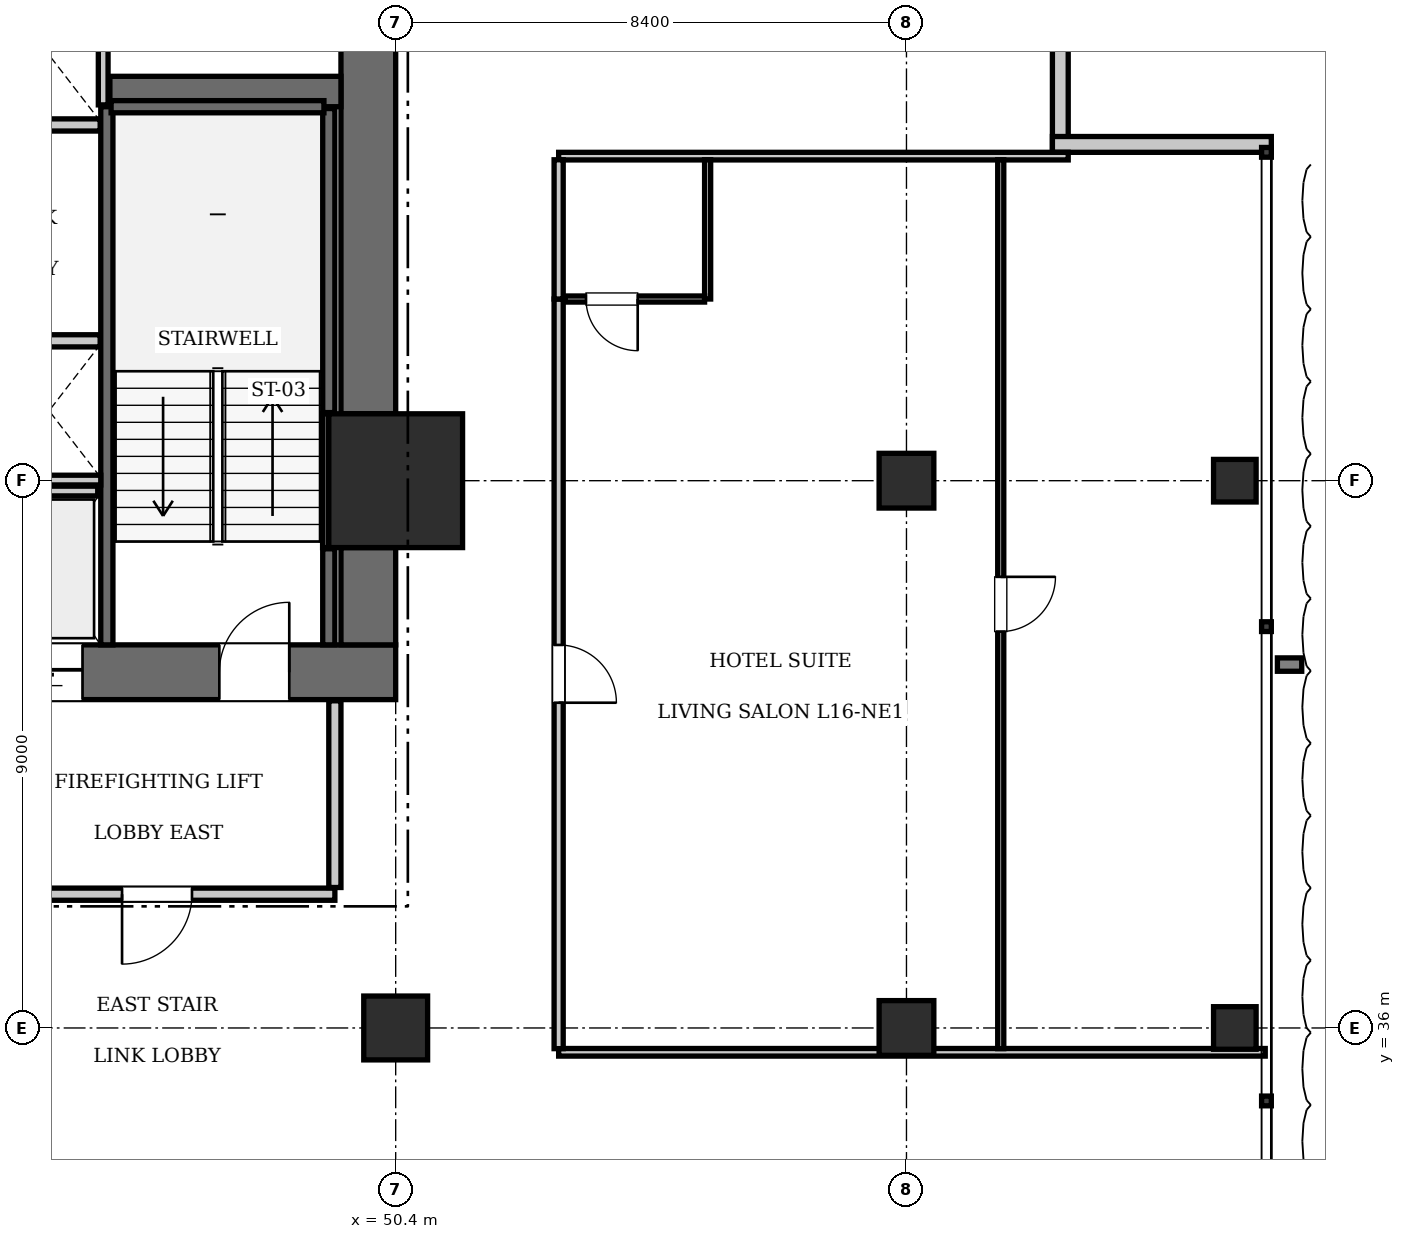
"""IFC4 building model, lengths in metres.
Left out: names, types, materials, properties, quantities, classifications, styles, units other than length and angle.
Written with IfcOpenShell. Run it as: python <this file> out.ifc"""

import sys

from ifc_helpers import new_model, si_unit, direction, frame, frame_2d, origin, origin_2d, place, context, subcontext, project, spatial, rectangle, i_section, extrude, element, fill, save


model = new_model("IFC4")
c1 = context("Model", 3, precision=1e-05, world=origin(), true_north=direction((0.0, 1.0)))
c2 = subcontext(c1, "Body", "Model", "MODEL_VIEW")
j1 = project(units=[si_unit("LENGTHUNIT", "METRE"), si_unit("PLANEANGLEUNIT", "RADIAN")], contexts=[c1])
p1 = place(None, origin())
s1 = spatial("IfcSite", under=j1, at=p1, CompositionType="ELEMENT")
p2 = place(p1, origin())
s2 = spatial("IfcBuilding", under=s1, at=p2, CompositionType="ELEMENT")
p3 = place(p2, frame((0.0, 0.0, 69.3)))
s3 = spatial("IfcBuildingStorey", under=s2, at=p3, CompositionType="ELEMENT", Elevation=69.3)
p4 = place(p3, frame((50.4, 45.0, 0.0), z_axis=(0.0, 0.0, 1.0), x_axis=(1.0, 0.0, 0.0)))
e1 = element("IfcColumn", 1, at=p4, inside=s3, PredefinedType="COLUMN", context=c2, shape_type="SweptSolid", body=[
    extrude(rectangle(XDim=2.2, YDim=2.2, at=origin_2d()), origin(), (0.0, 0.0, 1.0), 3.85),
])
p5 = place(p3, frame((43.6, 41.85, 0.0), z_axis=(0.0, 0.0, 1.0), x_axis=(1.0, 0.0, 0.0)))
e2 = element("IfcWall", 2, at=p5, inside=s3, PredefinedType="SHEAR", context=c2, shape_type="SweptSolid", body=[
    extrude(rectangle(XDim=6.8, YDim=0.9, at=frame_2d((3.4, 0.0))), origin(), (0.0, 0.0, 1.0), 3.85),
])
p6 = place(p5, frame((3.9, 0.0, 0.0)))
e3 = element("IfcOpeningElement", 3, at=p6, cuts=e2, PredefinedType="OPENING", context=c2, shape_type="SweptSolid", body=[
    extrude(rectangle(XDim=1.15, YDim=2.15, at=frame_2d((0.575, 1.075))), frame((0.0, 0.46, 0.0), z_axis=(0.0, -1.0, 0.0), x_axis=(1.0, 0.0, 0.0)), (0.0, 0.0, 1.0), 0.92),
])
p7 = place(p5, frame((0.55, 0.0, 0.0)))
e4 = element("IfcOpeningElement", 4, at=p7, cuts=e2, PredefinedType="OPENING", context=c2, shape_type="SweptSolid", body=[
    extrude(rectangle(XDim=1.1, YDim=2.2, at=frame_2d((0.55, 1.1))), frame((0.0, 0.46, 0.0), z_axis=(0.0, -1.0, 0.0), x_axis=(1.0, 0.0, 0.0)), (0.0, 0.0, 1.0), 0.92),
])
p8 = place(p3, frame((49.95, 42.3, 0.0), z_axis=(0.0, 0.0, 1.0), x_axis=(0.0, 1.0, 0.0)))
e5 = element("IfcWall", 5, at=p8, inside=s3, PredefinedType="SHEAR", context=c2, shape_type="SweptSolid", body=[
    extrude(rectangle(XDim=1.6, YDim=0.9, at=frame_2d((0.8, 0.0))), origin(), (0.0, 0.0, 1.0), 3.85),
])
p9 = place(p3, frame((49.95, 46.1, 0.0), z_axis=(0.0, 0.0, 1.0), x_axis=(0.0, 1.0, 0.0)))
e6 = element("IfcWall", 6, at=p9, inside=s3, PredefinedType="SHEAR", context=c2, shape_type="SweptSolid", body=[
    extrude(rectangle(XDim=7.0, YDim=0.9, at=frame_2d((3.5, 0.0))), origin(), (0.0, 0.0, 1.0), 3.85),
])
p10 = place(p3, frame((45.7, 51.4, 0.0), z_axis=(0.0, 0.0, 1.0), x_axis=(1.0, 0.0, 0.0)))
e7 = element("IfcWall", 7, at=p10, inside=s3, PredefinedType="SHEAR", context=c2, shape_type="SweptSolid", body=[
    extrude(rectangle(XDim=3.8, YDim=0.5, at=frame_2d((1.9, 0.0))), origin(), (0.0, 0.0, 1.0), 3.85),
])
p11 = place(p3, frame((50.4, 36.0, 0.0), z_axis=(0.0, 0.0, 1.0), x_axis=(1.0, 0.0, 0.0)))
e8 = element("IfcColumn", 8, at=p11, inside=s3, PredefinedType="COLUMN", context=c2, shape_type="SweptSolid", body=[
    extrude(rectangle(XDim=1.05, YDim=1.05, at=origin_2d()), origin(), (0.0, 0.0, 1.0), 3.85),
])
for number, where, z_axis, x_axis in (
    (9, (58.8, 36.0, 0.0), (0.0, 0.0, 1.0), (1.0, 0.0, 0.0)),
    (10, (58.8, 45.0, 0.0), (0.0, 0.0, 1.0), (1.0, 0.0, 0.0)),
):
    element("IfcColumn", number, at=place(p3, frame(where, z_axis=z_axis, x_axis=x_axis)), inside=s3, PredefinedType="COLUMN", context=c2, shape_type="SweptSolid", body=[
        extrude(rectangle(XDim=0.9, YDim=0.9, at=origin_2d()), origin(), (0.0, 0.0, 1.0), 3.85),
    ])
for number, where, z_axis, x_axis in (
    (11, (64.2, 36.0, 0.0), (0.0, 0.0, 1.0), (1.0, 0.0, 0.0)),
    (12, (64.2, 45.0, 0.0), (0.0, 0.0, 1.0), (1.0, 0.0, 0.0)),
):
    element("IfcColumn", number, at=place(p3, frame(where, z_axis=z_axis, x_axis=x_axis)), inside=s3, PredefinedType="COLUMN", context=c2, shape_type="SweptSolid", body=[
        extrude(i_section(OverallWidth=0.7, OverallDepth=0.7, WebThickness=0.028, FlangeThickness=0.044, at=origin_2d()), origin(), (0.0, 0.0, 1.0), 3.85),
    ])
p12 = place(p3, frame((45.65, 42.3, 0.0), z_axis=(0.0, 0.0, 1.0), x_axis=(0.0, 1.0, 0.0)))
e13 = element("IfcWall", 13, at=p12, inside=s3, PredefinedType="SOLIDWALL", context=c2, shape_type="SweptSolid", body=[
    extrude(rectangle(XDim=8.85, YDim=0.2, at=frame_2d((4.425, 0.0))), origin(), (0.0, 0.0, 1.0), 3.61),
])
p13 = place(p3, frame((49.3, 42.3, 0.0), z_axis=(0.0, 0.0, 1.0), x_axis=(0.0, 1.0, 0.0)))
e14 = element("IfcWall", 14, at=p13, inside=s3, PredefinedType="SOLIDWALL", context=c2, shape_type="SweptSolid", body=[
    extrude(rectangle(XDim=1.58, YDim=0.2, at=frame_2d((0.79, 0.0))), origin(), (0.0, 0.0, 1.0), 3.61),
])
p14 = place(p3, frame((49.3, 46.12, 0.0), z_axis=(0.0, 0.0, 1.0), x_axis=(0.0, 1.0, 0.0)))
e15 = element("IfcWall", 15, at=p14, inside=s3, PredefinedType="SOLIDWALL", context=c2, shape_type="SweptSolid", body=[
    extrude(rectangle(XDim=5.0, YDim=0.2, at=frame_2d((2.5, 0.0))), origin(), (0.0, 0.0, 1.0), 3.61),
])
p15 = place(p3, frame((45.72, 51.15, 0.0), z_axis=(0.0, 0.0, 1.0), x_axis=(1.0, 0.0, 0.0)))
e16 = element("IfcWall", 16, at=p15, inside=s3, PredefinedType="SOLIDWALL", context=c2, shape_type="SweptSolid", body=[
    extrude(rectangle(XDim=3.5, YDim=0.2, at=frame_2d((1.75, 0.0))), origin(), (0.0, 0.0, 1.0), 3.61),
])
p16 = place(p3, frame((49.248, 43.9, 0.0), z_axis=(0.0, 0.0, 1.0), x_axis=(0.0, 1.0, 0.0)))
e17 = element("IfcWall", 17, at=p16, inside=s3, PredefinedType="SOLIDWALL", context=c2, shape_type="SweptSolid", body=[
    extrude(rectangle(XDim=2.2, YDim=0.1, at=frame_2d((1.1, 0.0))), origin(), (0.0, 0.0, 1.0), 3.61),
])
for number, where, z_axis, x_axis in (
    (18, (43.86, 47.3, 0.0), (0.0, 0.0, 1.0), (1.0, 0.0, 0.0)),
    (19, (43.86, 50.85, 0.0), (0.0, 0.0, 1.0), (1.0, 0.0, 0.0)),
):
    element("IfcWall", number, at=place(p3, frame(where, z_axis=z_axis, x_axis=x_axis)), inside=s3, PredefinedType="SOLIDWALL", context=c2, shape_type="SweptSolid", body=[
        extrude(rectangle(XDim=1.68, YDim=0.2, at=frame_2d((0.84, 0.0))), origin(), (0.0, 0.0, 1.0), 3.61),
    ])
p17 = place(p3, frame((43.9, 44.83, 0.0), z_axis=(0.0, 0.0, 1.0), x_axis=(1.0, 0.0, 0.0)))
e20 = element("IfcWall", 20, at=p17, inside=s3, PredefinedType="SOLIDWALL", context=c2, shape_type="SweptSolid", body=[
    extrude(rectangle(XDim=1.6, YDim=0.16, at=frame_2d((0.8, 0.0))), origin(), (0.0, 0.0, 1.0), 3.61),
])
p18 = place(p3, frame((42.1, 45.01, 0.0), z_axis=(0.0, 0.0, 1.0), x_axis=(1.0, 0.0, 0.0)))
e21 = element("IfcWall", 21, at=p18, inside=s3, PredefinedType="SOLIDWALL", context=c2, shape_type="SweptSolid", body=[
    extrude(rectangle(XDim=3.45, YDim=0.16, at=frame_2d((1.725, 0.0))), origin(), (0.0, 0.0, 1.0), 3.61),
])
p19 = place(p3, frame((45.59, 51.18, 0.0), z_axis=(0.0, 0.0, 1.0), x_axis=(0.0, 1.0, 0.0)))
e22 = element("IfcWall", 22, at=p19, inside=s3, PredefinedType="SOLIDWALL", context=c2, shape_type="SweptSolid", body=[
    extrude(rectangle(XDim=1.92, YDim=0.16, at=frame_2d((0.96, 0.0))), origin(), (0.0, 0.0, 1.0), 3.61),
])
for number, where, z_axis, x_axis in (
    (23, (61.33, 54.0, 0.0), (0.0, 0.0, 1.0), (0.0, -1.0, 0.0)),
    (24, (61.2, 50.53, 0.0), (0.0, 0.0, 1.0), (1.0, 0.0, 0.0)),
):
    element("IfcWall", number, at=place(p3, frame(where, z_axis=z_axis, x_axis=x_axis)), inside=s3, PredefinedType="SOLIDWALL", context=c2, shape_type="SweptSolid", body=[
        extrude(rectangle(XDim=3.6, YDim=0.26, at=frame_2d((1.8, 0.0))), origin(), (0.0, 0.0, 1.0), 3.61),
    ])
p20 = place(p3, frame((43.6, 38.2, 0.0), z_axis=(0.0, 0.0, 1.0), x_axis=(1.0, 0.0, 0.0)))
e25 = element("IfcWall", 25, at=p20, inside=s3, PredefinedType="PARTITIONING", context=c2, shape_type="SweptSolid", body=[
    extrude(rectangle(XDim=5.8, YDim=0.2, at=frame_2d((2.9, 0.0))), origin(), (0.0, 0.0, 1.0), 3.61),
])
p21 = place(p20, frame((2.3, 0.0, 0.0)))
e26 = element("IfcOpeningElement", 26, at=p21, cuts=e25, PredefinedType="OPENING", context=c2, shape_type="SweptSolid", body=[
    extrude(rectangle(XDim=1.15, YDim=2.15, at=frame_2d((0.575, 1.075))), frame((0.0, 0.11, 0.0), z_axis=(0.0, -1.0, 0.0), x_axis=(1.0, 0.0, 0.0)), (0.0, 0.0, 1.0), 0.22),
])
p22 = place(p3, frame((49.4, 38.31, 0.0), z_axis=(0.0, 0.0, 1.0), x_axis=(0.0, 1.0, 0.0)))
e27 = element("IfcWall", 27, at=p22, inside=s3, PredefinedType="PARTITIONING", context=c2, shape_type="SweptSolid", body=[
    extrude(rectangle(XDim=3.07, YDim=0.2, at=frame_2d((1.535, 0.0))), origin(), (0.0, 0.0, 1.0), 3.61),
])
p23 = place(p3, frame((53.08, 35.6, 0.0), z_axis=(0.0, 0.0, 1.0), x_axis=(1.0, 0.0, 0.0)))
e28 = element("IfcWall", 28, at=p23, inside=s3, PredefinedType="PARTITIONING", context=c2, shape_type="SweptSolid", body=[
    extrude(rectangle(XDim=11.62, YDim=0.125, at=frame_2d((5.81, 0.0))), origin(), (0.0, 0.0, 1.0), 3.61),
])
p24 = place(p3, frame((53.08, 50.337, 0.0), z_axis=(0.0, 0.0, 1.0), x_axis=(1.0, 0.0, 0.0)))
e29 = element("IfcWall", 29, at=p24, inside=s3, PredefinedType="PARTITIONING", context=c2, shape_type="SweptSolid", body=[
    extrude(rectangle(XDim=8.38, YDim=0.125, at=frame_2d((4.19, 0.0))), origin(), (0.0, 0.0, 1.0), 3.61),
])
p25 = place(p3, frame((53.08, 35.66, 0.0), z_axis=(0.0, 0.0, 1.0), x_axis=(0.0, 1.0, 0.0)))
e30 = element("IfcWall", 30, at=p25, inside=s3, PredefinedType="PARTITIONING", context=c2, shape_type="SweptSolid", body=[
    extrude(rectangle(XDim=12.328, YDim=0.15, at=frame_2d((6.164, 0.0))), origin(), (0.0, 0.0, 1.0), 3.61),
])
p26 = place(p25, frame((5.689, 0.0, 0.0)))
e31 = element("IfcOpeningElement", 31, at=p26, cuts=e30, PredefinedType="OPENING", context=c2, shape_type="SweptSolid", body=[
    extrude(rectangle(XDim=0.95, YDim=2.15, at=frame_2d((0.475, 1.075))), frame((0.0, 0.085, 0.0), z_axis=(0.0, -1.0, 0.0), x_axis=(1.0, 0.0, 0.0)), (0.0, 0.0, 1.0), 0.17),
])
p27 = place(p3, frame((53.08, 47.988, 0.0), z_axis=(0.0, 0.0, 1.0), x_axis=(0.0, 1.0, 0.0)))
e32 = element("IfcWall", 32, at=p27, inside=s3, PredefinedType="PARTITIONING", context=c2, shape_type="SweptSolid", body=[
    extrude(rectangle(XDim=2.29, YDim=0.15, at=frame_2d((1.145, 0.0))), origin(), (0.0, 0.0, 1.0), 3.61),
])
p28 = place(p3, frame((55.53, 47.988, 0.0), z_axis=(0.0, 0.0, 1.0), x_axis=(0.0, 1.0, 0.0)))
e33 = element("IfcWall", 33, at=p28, inside=s3, PredefinedType="PARTITIONING", context=c2, shape_type="SweptSolid", body=[
    extrude(rectangle(XDim=2.29, YDim=0.1, at=frame_2d((1.145, 0.0))), origin(), (0.0, 0.0, 1.0), 3.61),
])
p29 = place(p3, frame((53.18, 47.988, 0.0), z_axis=(0.0, 0.0, 1.0), x_axis=(1.0, 0.0, 0.0)))
e34 = element("IfcWall", 34, at=p29, inside=s3, PredefinedType="PARTITIONING", context=c2, shape_type="SweptSolid", body=[
    extrude(rectangle(XDim=2.3, YDim=0.1, at=frame_2d((1.15, 0.0))), origin(), (0.0, 0.0, 1.0), 3.61),
])
p30 = place(p29, frame((0.35, 0.0, 0.0)))
e35 = element("IfcOpeningElement", 35, at=p30, cuts=e34, PredefinedType="OPENING", context=c2, shape_type="SweptSolid", body=[
    extrude(rectangle(XDim=0.85, YDim=2.1, at=frame_2d((0.425, 1.05))), frame((0.0, 0.06, 0.0), z_axis=(0.0, -1.0, 0.0), x_axis=(1.0, 0.0, 0.0)), (0.0, 0.0, 1.0), 0.12),
])
p31 = place(p3, frame((60.35, 35.66, 0.0), z_axis=(0.0, 0.0, 1.0), x_axis=(0.0, 1.0, 0.0)))
e36 = element("IfcWall", 36, at=p31, inside=s3, PredefinedType="PARTITIONING", context=c2, shape_type="SweptSolid", body=[
    extrude(rectangle(XDim=14.618, YDim=0.1, at=frame_2d((7.309, 0.0))), origin(), (0.0, 0.0, 1.0), 3.61),
])
p32 = place(p31, frame((6.859, 0.0, 0.0)))
e37 = element("IfcOpeningElement", 37, at=p32, cuts=e36, PredefinedType="OPENING", context=c2, shape_type="SweptSolid", body=[
    extrude(rectangle(XDim=0.9, YDim=2.1, at=frame_2d((0.45, 1.05))), frame((0.0, 0.06, 0.0), z_axis=(0.0, -1.0, 0.0), x_axis=(1.0, 0.0, 0.0)), (0.0, 0.0, 1.0), 0.12),
])
p33 = place(p6, origin())
e38 = element("IfcDoor", 38, at=p33, inside=s3, OperationType="SINGLE_SWING_RIGHT", PredefinedType="DOOR", context=c2, shape_type="SweptSolid", body=[
    extrude(rectangle(XDim=1.15, YDim=2.15, at=frame_2d((0.575, 1.075))), frame((0.0, 0.025, 0.0), z_axis=(0.0, -1.0, 0.0), x_axis=(1.0, 0.0, 0.0)), (0.0, 0.0, 1.0), 0.05),
])
fill(e3, e38)
p34 = place(p7, frame((1.1, 0.0, 0.0), z_axis=(0.0, 0.0, 1.0), x_axis=(-1.0, 0.0, 0.0)))
e39 = element("IfcDoor", 39, at=p34, inside=s3, OperationType="SLIDING_TO_LEFT", PredefinedType="DOOR", context=c2, shape_type="SweptSolid", body=[
    extrude(rectangle(XDim=1.1, YDim=2.2, at=frame_2d((0.55, 1.1))), frame((0.0, 0.025, 0.0), z_axis=(0.0, -1.0, 0.0), x_axis=(1.0, 0.0, 0.0)), (0.0, 0.0, 1.0), 0.05),
])
fill(e4, e39)
p35 = place(p21, frame((1.15, 0.0, 0.0), z_axis=(0.0, 0.0, 1.0), x_axis=(-1.0, 0.0, 0.0)))
e40 = element("IfcDoor", 40, at=p35, inside=s3, OperationType="SINGLE_SWING_RIGHT", PredefinedType="DOOR", context=c2, shape_type="SweptSolid", body=[
    extrude(rectangle(XDim=1.15, YDim=2.15, at=frame_2d((0.575, 1.075))), frame((0.0, 0.025, 0.0), z_axis=(0.0, -1.0, 0.0), x_axis=(1.0, 0.0, 0.0)), (0.0, 0.0, 1.0), 0.05),
])
fill(e26, e40)
p36 = place(p30, frame((0.85, 0.0, 0.0), z_axis=(0.0, 0.0, 1.0), x_axis=(-1.0, 0.0, 0.0)))
e41 = element("IfcDoor", 41, at=p36, inside=s3, OperationType="SINGLE_SWING_LEFT", PredefinedType="DOOR", context=c2, shape_type="SweptSolid", body=[
    extrude(rectangle(XDim=0.85, YDim=2.1, at=frame_2d((0.425, 1.05))), frame((0.0, 0.025, 0.0), z_axis=(0.0, -1.0, 0.0), x_axis=(1.0, 0.0, 0.0)), (0.0, 0.0, 1.0), 0.05),
])
fill(e35, e41)
p37 = place(p26, frame((0.95, 0.0, 0.0), z_axis=(0.0, 0.0, 1.0), x_axis=(-1.0, 0.0, 0.0)))
e42 = element("IfcDoor", 42, at=p37, inside=s3, OperationType="SINGLE_SWING_RIGHT", PredefinedType="DOOR", context=c2, shape_type="SweptSolid", body=[
    extrude(rectangle(XDim=0.95, YDim=2.15, at=frame_2d((0.475, 1.075))), frame((0.0, 0.025, 0.0), z_axis=(0.0, -1.0, 0.0), x_axis=(1.0, 0.0, 0.0)), (0.0, 0.0, 1.0), 0.05),
])
fill(e31, e42)
p38 = place(p32, frame((0.9, 0.0, 0.0), z_axis=(0.0, 0.0, 1.0), x_axis=(-1.0, 0.0, 0.0)))
e43 = element("IfcDoor", 43, at=p38, inside=s3, OperationType="SINGLE_SWING_LEFT", PredefinedType="DOOR", context=c2, shape_type="SweptSolid", body=[
    extrude(rectangle(XDim=0.9, YDim=2.1, at=frame_2d((0.45, 1.05))), frame((0.0, 0.025, 0.0), z_axis=(0.0, -1.0, 0.0), x_axis=(1.0, 0.0, 0.0)), (0.0, 0.0, 1.0), 0.05),
])
fill(e37, e43)
save(model, sys.argv[1])
